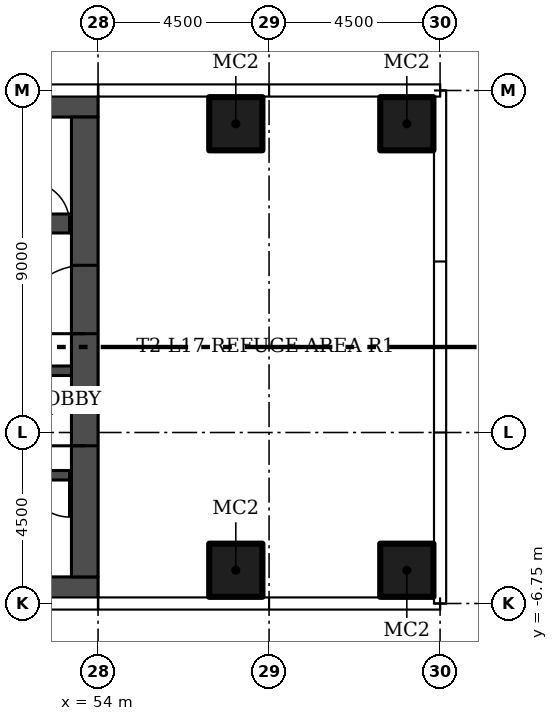
"""IFC4 building model, lengths in metres.
Left out: names, types, materials, properties, quantities, classifications, styles, units other than length and angle.
Written with IfcOpenShell. Run it as: python <this file> out.ifc"""

import sys

from ifc_helpers import new_model, si_unit, direction, frame, frame_2d, origin, origin_2d, place, context, subcontext, project, spatial, rectangle, hollow_rectangle, extrude, element, fill, save


model = new_model("IFC4")
c1 = context("Model", 3, precision=1e-05, world=origin(), true_north=direction((0.0, 1.0)))
c2 = subcontext(c1, "Body", "Model", "MODEL_VIEW")
j1 = project(units=[si_unit("LENGTHUNIT", "METRE"), si_unit("PLANEANGLEUNIT", "RADIAN")], contexts=[c1])
p1 = place(None, origin())
s1 = spatial("IfcSite", under=j1, at=p1, CompositionType="ELEMENT")
p2 = place(p1, origin())
s2 = spatial("IfcBuilding", under=s1, at=p2, CompositionType="ELEMENT")
p3 = place(p2, frame((0.0, 0.0, 77.1)))
s3 = spatial("IfcBuildingStorey", under=s2, at=p3, CompositionType="ELEMENT", Elevation=77.1)
for number, where in (
    (1, (57.625, -5.875, 0.0)),
    (2, (62.125, -5.875, 0.0)),
    (3, (57.625, 5.875, 0.0)),
    (4, (62.125, 5.875, 0.0)),
):
    element("IfcColumn", number, at=place(p3, frame(where)), inside=s3, PredefinedType="COLUMN", context=c2, shape_type="SweptSolid", body=[
        extrude(hollow_rectangle(XDim=1.4, YDim=1.4, WallThickness=0.05, at=origin_2d()), origin(), (0.0, 0.0, 1.0), 4.45),
    ])
for number, where, z_axis, x_axis in (
    (5, (54.0, -6.4, 0.0), (0.0, 0.0, 1.0), (-1.0, 0.0, 0.0)),
    (6, (54.0, 6.4, 0.0), (0.0, 0.0, 1.0), (-1.0, 0.0, 0.0)),
):
    element("IfcWall", number, at=place(p3, frame(where, z_axis=z_axis, x_axis=x_axis)), inside=s3, PredefinedType="SHEAR", context=c2, shape_type="SweptSolid", body=[
        extrude(rectangle(XDim=13.5, YDim=0.7, at=frame_2d((6.75, 0.0))), origin(), (0.0, 0.0, 1.0), 4.45),
    ])
p4 = place(p3, frame((53.65, -6.05, 0.0), z_axis=(0.0, 0.0, 1.0), x_axis=(0.0, 1.0, 0.0)))
e7 = element("IfcWall", 7, at=p4, inside=s3, PredefinedType="SHEAR", context=c2, shape_type="SweptSolid", body=[
    extrude(rectangle(XDim=12.1, YDim=0.7, at=frame_2d((6.05, 0.0))), origin(), (0.0, 0.0, 1.0), 4.45),
])
p5 = place(p4, frame((3.45, 0.0, 0.0)))
e8 = element("IfcOpeningElement", 8, at=p5, cuts=e7, PredefinedType="OPENING", context=c2, shape_type="SweptSolid", body=[
    extrude(rectangle(XDim=1.2, YDim=2.1, at=frame_2d((0.6, 1.05))), frame((0.0, 0.36, 0.0), z_axis=(0.0, -1.0, 0.0), x_axis=(1.0, 0.0, 0.0)), (0.0, 0.0, 1.0), 0.72),
])
p6 = place(p4, frame((6.4, 0.0, 0.0)))
e9 = element("IfcOpeningElement", 9, at=p6, cuts=e7, PredefinedType="OPENING", context=c2, shape_type="SweptSolid", body=[
    extrude(rectangle(XDim=1.8, YDim=2.4, at=frame_2d((0.9, 1.2))), frame((0.0, 0.36, 0.0), z_axis=(0.0, -1.0, 0.0), x_axis=(1.0, 0.0, 0.0)), (0.0, 0.0, 1.0), 0.72),
])
p7 = place(p3, frame((53.3, -3.375, 0.0), z_axis=(0.0, 0.0, 1.0), x_axis=(-1.0, 0.0, 0.0)))
e10 = element("IfcWall", 10, at=p7, inside=s3, PredefinedType="SHEAR", context=c2, shape_type="SweptSolid", body=[
    extrude(rectangle(XDim=12.1, YDim=0.25, at=frame_2d((6.05, 0.0))), origin(), (0.0, 0.0, 1.0), 4.45),
])
p8 = place(p7, frame((0.05, 0.0, 0.0)))
e11 = element("IfcOpeningElement", 11, at=p8, cuts=e10, PredefinedType="OPENING", context=c2, shape_type="SweptSolid", body=[
    extrude(rectangle(XDim=1.1, YDim=2.1, at=frame_2d((0.55, 1.05))), frame((0.0, 0.135, 0.0), z_axis=(0.0, -1.0, 0.0), x_axis=(1.0, 0.0, 0.0)), (0.0, 0.0, 1.0), 0.27),
])
p9 = place(p3, frame((53.3, -0.625, 0.0), z_axis=(0.0, 0.0, 1.0), x_axis=(-1.0, 0.0, 0.0)))
e12 = element("IfcWall", 12, at=p9, inside=s3, PredefinedType="SHEAR", context=c2, shape_type="SweptSolid", body=[
    extrude(rectangle(XDim=12.1, YDim=0.25, at=frame_2d((6.05, 0.0))), origin(), (0.0, 0.0, 1.0), 4.45),
])
p10 = place(p9, frame((2.25, 0.0, 0.0)))
e13 = element("IfcOpeningElement", 13, at=p10, cuts=e12, PredefinedType="OPENING", context=c2, shape_type="SweptSolid", body=[
    extrude(rectangle(XDim=1.2, YDim=2.1, at=frame_2d((0.6, 1.05))), frame((0.0, 0.135, 0.0), z_axis=(0.0, -1.0, 0.0), x_axis=(1.0, 0.0, 0.0)), (0.0, 0.0, 1.0), 0.27),
])
p11 = place(p9, frame((10.025, 0.0, 0.0)))
e14 = element("IfcOpeningElement", 14, at=p11, cuts=e12, PredefinedType="OPENING", context=c2, shape_type="SweptSolid", body=[
    extrude(rectangle(XDim=0.9, YDim=2.1, at=frame_2d((0.45, 1.05))), frame((0.0, 0.135, 0.0), z_axis=(0.0, -1.0, 0.0), x_axis=(1.0, 0.0, 0.0)), (0.0, 0.0, 1.0), 0.27),
])
p12 = place(p3, frame((46.0, 3.25, 0.0)))
e15 = element("IfcWall", 15, at=p12, inside=s3, PredefinedType="SHEAR", context=c2, shape_type="SweptSolid", body=[
    extrude(rectangle(XDim=7.3, YDim=0.5, at=frame_2d((3.65, 0.0))), origin(), (0.0, 0.0, 1.0), 4.45),
])
p13 = place(p12, frame((6.15, 0.0, 0.0)))
e16 = element("IfcOpeningElement", 16, at=p13, cuts=e15, PredefinedType="OPENING", context=c2, shape_type="SweptSolid", body=[
    extrude(rectangle(XDim=1.1, YDim=2.1, at=frame_2d((0.55, 1.05))), frame((0.0, 0.26, 0.0), z_axis=(0.0, -1.0, 0.0), x_axis=(1.0, 0.0, 0.0)), (0.0, 0.0, 1.0), 0.52),
])
p14 = place(p5, origin())
e17 = element("IfcDoor", 17, at=p14, inside=s3, OperationType="SINGLE_SWING_LEFT", PredefinedType="DOOR", context=c2, shape_type="SweptSolid", body=[
    extrude(rectangle(XDim=1.2, YDim=2.1, at=frame_2d((0.6, 1.05))), frame((0.0, 0.025, 0.0), z_axis=(0.0, -1.0, 0.0), x_axis=(1.0, 0.0, 0.0)), (0.0, 0.0, 1.0), 0.05),
])
fill(e8, e17)
p15 = place(p6, origin())
e18 = element("IfcDoor", 18, at=p15, inside=s3, OperationType="DOUBLE_DOOR_SINGLE_SWING", PredefinedType="DOOR", context=c2, shape_type="SweptSolid", body=[
    extrude(rectangle(XDim=1.8, YDim=2.4, at=frame_2d((0.9, 1.2))), frame((0.0, 0.025, 0.0), z_axis=(0.0, -1.0, 0.0), x_axis=(1.0, 0.0, 0.0)), (0.0, 0.0, 1.0), 0.05),
])
fill(e9, e18)
p16 = place(p8, origin())
e19 = element("IfcDoor", 19, at=p16, inside=s3, OperationType="SINGLE_SWING_LEFT", PredefinedType="DOOR", context=c2, shape_type="SweptSolid", body=[
    extrude(rectangle(XDim=1.1, YDim=2.1, at=frame_2d((0.55, 1.05))), frame((0.0, 0.025, 0.0), z_axis=(0.0, -1.0, 0.0), x_axis=(1.0, 0.0, 0.0)), (0.0, 0.0, 1.0), 0.05),
])
fill(e11, e19)
p17 = place(p13, origin())
e20 = element("IfcDoor", 20, at=p17, inside=s3, OperationType="SINGLE_SWING_RIGHT", PredefinedType="DOOR", context=c2, shape_type="SweptSolid", body=[
    extrude(rectangle(XDim=1.1, YDim=2.1, at=frame_2d((0.55, 1.05))), frame((0.0, 0.025, 0.0), z_axis=(0.0, -1.0, 0.0), x_axis=(1.0, 0.0, 0.0)), (0.0, 0.0, 1.0), 0.05),
])
fill(e16, e20)
save(model, sys.argv[1])
